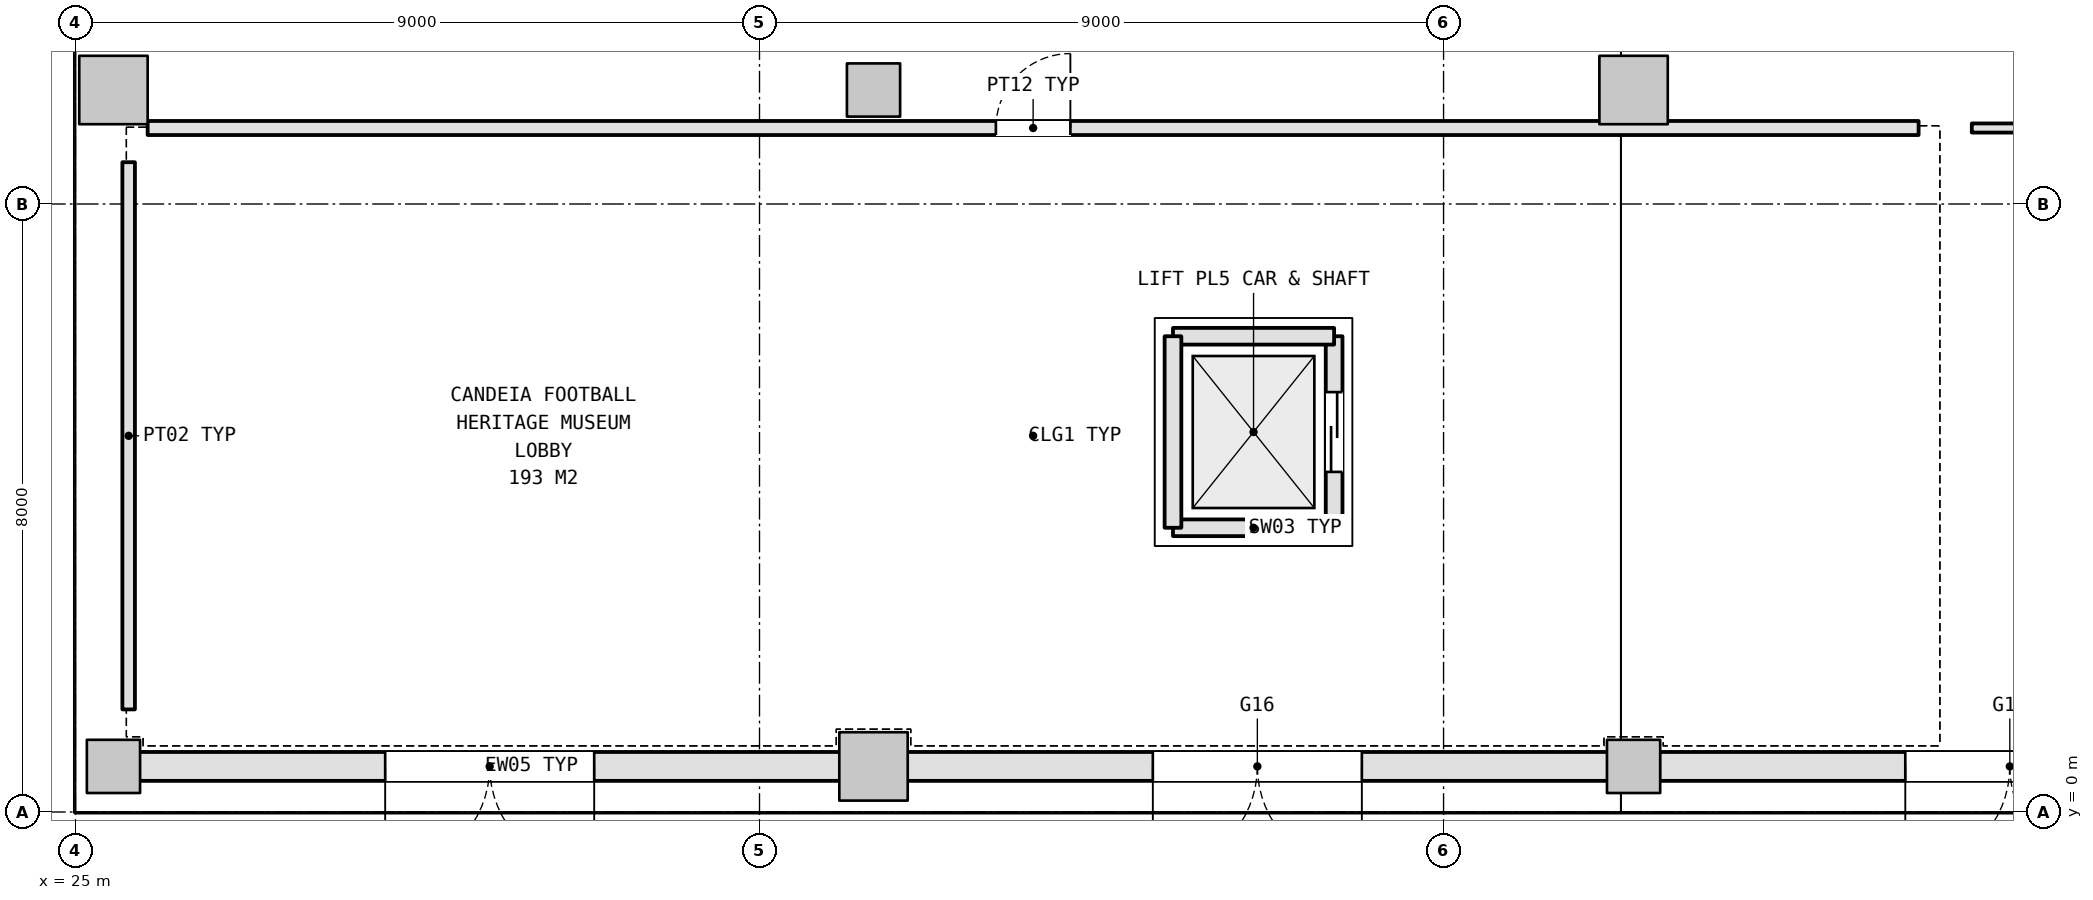
"""IFC4 building model, lengths in metres.
Left out: names, types, materials, properties, quantities, classifications, styles, units other than length and angle.
Written with IfcOpenShell. Run it as: python <this file> out.ifc"""

import sys

from ifc_helpers import new_model, si_unit, direction, frame, frame_2d, origin, origin_2d, place, context, subcontext, project, spatial, rectangle, extrude, element, fill, save


model = new_model("IFC4")
c1 = context("Model", 3, precision=1e-05, world=origin(), true_north=direction((0.0, 1.0)))
c2 = subcontext(c1, "Body", "Model", "MODEL_VIEW")
j1 = project(units=[si_unit("LENGTHUNIT", "METRE"), si_unit("PLANEANGLEUNIT", "RADIAN")], contexts=[c1])
p1 = place(None, origin())
s1 = spatial("IfcSite", under=j1, at=p1, CompositionType="ELEMENT")
p2 = place(p1, origin())
s2 = spatial("IfcBuilding", under=s1, at=p2, CompositionType="ELEMENT")
p3 = place(p2, origin())
s3 = spatial("IfcBuildingStorey", under=s2, at=p3, CompositionType="ELEMENT", Elevation=0.0)
p4 = place(p3, frame((25.5, 0.6, 0.0), z_axis=(0.0, 0.0, 1.0), x_axis=(1.0, 0.0, 0.0)))
e1 = element("IfcColumn", 1, at=p4, inside=s3, PredefinedType="COLUMN", context=c2, shape_type="SweptSolid", body=[
    extrude(rectangle(XDim=0.7, YDim=0.7, at=origin_2d()), origin(), (0.0, 0.0, 1.0), 5.4),
])
for number, where, z_axis, x_axis in (
    (2, (25.5, 9.5, 0.0), (0.0, 0.0, 1.0), (1.0, 0.0, 0.0)),
    (3, (35.5, 0.6, 0.0), (0.0, 0.0, 1.0), (1.0, 0.0, 0.0)),
):
    element("IfcColumn", number, at=place(p3, frame(where, z_axis=z_axis, x_axis=x_axis)), inside=s3, PredefinedType="COLUMN", context=c2, shape_type="SweptSolid", body=[
        extrude(rectangle(XDim=0.9, YDim=0.9, at=origin_2d()), origin(), (0.0, 0.0, 1.0), 5.4),
    ])
for number, where, z_axis, x_axis in (
    (4, (35.5, 9.5, 0.0), (0.0, 0.0, 1.0), (1.0, 0.0, 0.0)),
    (5, (45.5, 0.6, 0.0), (0.0, 0.0, 1.0), (1.0, 0.0, 0.0)),
):
    element("IfcColumn", number, at=place(p3, frame(where, z_axis=z_axis, x_axis=x_axis)), inside=s3, PredefinedType="COLUMN", context=c2, shape_type="SweptSolid", body=[
        extrude(rectangle(XDim=0.7, YDim=0.7, at=origin_2d()), origin(), (0.0, 0.0, 1.0), 5.4),
    ])
p5 = place(p3, frame((45.5, 9.5, 0.0), z_axis=(0.0, 0.0, 1.0), x_axis=(1.0, 0.0, 0.0)))
e6 = element("IfcColumn", 6, at=p5, inside=s3, PredefinedType="COLUMN", context=c2, shape_type="SweptSolid", body=[
    extrude(rectangle(XDim=0.9, YDim=0.9, at=origin_2d()), origin(), (0.0, 0.0, 1.0), 5.4),
])
p6 = place(p3, frame((25.838, 0.6, 0.0), z_axis=(0.0, 0.0, 1.0), x_axis=(1.0, 0.0, 0.0)))
e7 = element("IfcWall", 7, at=p6, inside=s3, PredefinedType="SOLIDWALL", context=c2, shape_type="SweptSolid", body=[
    extrude(rectangle(XDim=9.224, YDim=0.38, at=frame_2d((4.612, 0.0))), origin(), (0.0, 0.0, 1.0), 4.425),
])
p7 = place(p6, frame((3.237, 0.0, 0.0)))
e8 = element("IfcOpeningElement", 8, at=p7, cuts=e7, PredefinedType="OPENING", context=c2, shape_type="SweptSolid", body=[
    extrude(rectangle(XDim=2.75, YDim=2.4, at=frame_2d((1.375, 1.2))), frame((0.0, 0.2, 0.0), z_axis=(0.0, -1.0, 0.0), x_axis=(1.0, 0.0, 0.0)), (0.0, 0.0, 1.0), 0.4),
])
p8 = place(p3, frame((35.938, 0.6, 0.0), z_axis=(0.0, 0.0, 1.0), x_axis=(1.0, 0.0, 0.0)))
e9 = element("IfcWall", 9, at=p8, inside=s3, PredefinedType="SOLIDWALL", context=c2, shape_type="SweptSolid", body=[
    extrude(rectangle(XDim=9.224, YDim=0.38, at=frame_2d((4.612, 0.0))), origin(), (0.0, 0.0, 1.0), 4.425),
])
p9 = place(p8, frame((3.237, 0.0, 0.0)))
e10 = element("IfcOpeningElement", 10, at=p9, cuts=e9, PredefinedType="OPENING", context=c2, shape_type="SweptSolid", body=[
    extrude(rectangle(XDim=2.75, YDim=2.4, at=frame_2d((1.375, 1.2))), frame((0.0, 0.2, 0.0), z_axis=(0.0, -1.0, 0.0), x_axis=(1.0, 0.0, 0.0)), (0.0, 0.0, 1.0), 0.4),
])
p10 = place(p3, frame((45.838, 0.6, 0.0), z_axis=(0.0, 0.0, 1.0), x_axis=(1.0, 0.0, 0.0)))
e11 = element("IfcWall", 11, at=p10, inside=s3, PredefinedType="SOLIDWALL", context=c2, shape_type="SweptSolid", body=[
    extrude(rectangle(XDim=9.224, YDim=0.38, at=frame_2d((4.612, 0.0))), origin(), (0.0, 0.0, 1.0), 4.425),
])
p11 = place(p10, frame((3.237, 0.0, 0.0)))
e12 = element("IfcOpeningElement", 12, at=p11, cuts=e11, PredefinedType="OPENING", context=c2, shape_type="SweptSolid", body=[
    extrude(rectangle(XDim=2.75, YDim=2.4, at=frame_2d((1.375, 1.2))), frame((0.0, 0.2, 0.0), z_axis=(0.0, -1.0, 0.0), x_axis=(1.0, 0.0, 0.0)), (0.0, 0.0, 1.0), 0.4),
])
p12 = place(p3, frame((39.44, 3.74, -1.1), z_axis=(0.0, 0.0, 1.0), x_axis=(1.0, 0.0, 0.0)))
e13 = element("IfcWall", 13, at=p12, inside=s3, PredefinedType="SHEAR", context=c2, shape_type="SweptSolid", body=[
    extrude(rectangle(XDim=2.12, YDim=0.22, at=frame_2d((1.06, 0.0))), origin(), (0.0, 0.0, 1.0), 6.24),
])
p13 = place(p3, frame((41.56, 3.74, -1.1), z_axis=(0.0, 0.0, 1.0), x_axis=(0.0, 1.0, 0.0)))
e14 = element("IfcWall", 14, at=p13, inside=s3, PredefinedType="SHEAR", context=c2, shape_type="SweptSolid", body=[
    extrude(rectangle(XDim=2.52, YDim=0.22, at=frame_2d((1.26, 0.0))), origin(), (0.0, 0.0, 1.0), 6.24),
])
p14 = place(p13, frame((0.735, 0.0, 1.1)))
e15 = element("IfcOpeningElement", 15, at=p14, cuts=e14, PredefinedType="OPENING", context=c2, shape_type="SweptSolid", body=[
    extrude(rectangle(XDim=1.05, YDim=2.15, at=frame_2d((0.525, 1.075))), frame((0.0, 0.12, 0.0), z_axis=(0.0, -1.0, 0.0), x_axis=(1.0, 0.0, 0.0)), (0.0, 0.0, 1.0), 0.24),
])
p15 = place(p3, frame((41.56, 6.26, -1.1), z_axis=(0.0, 0.0, 1.0), x_axis=(-1.0, 0.0, 0.0)))
e16 = element("IfcWall", 16, at=p15, inside=s3, PredefinedType="SHEAR", context=c2, shape_type="SweptSolid", body=[
    extrude(rectangle(XDim=2.12, YDim=0.22, at=frame_2d((1.06, 0.0))), origin(), (0.0, 0.0, 1.0), 6.24),
])
p16 = place(p3, frame((39.44, 6.26, -1.1), z_axis=(0.0, 0.0, 1.0), x_axis=(0.0, -1.0, 0.0)))
e17 = element("IfcWall", 17, at=p16, inside=s3, PredefinedType="SHEAR", context=c2, shape_type="SweptSolid", body=[
    extrude(rectangle(XDim=2.52, YDim=0.22, at=frame_2d((1.26, 0.0))), origin(), (0.0, 0.0, 1.0), 6.24),
])
p17 = place(p3, frame((25.95, 9.0, 0.0), z_axis=(0.0, 0.0, 1.0), x_axis=(1.0, 0.0, 0.0)))
e18 = element("IfcWall", 18, at=p17, inside=s3, PredefinedType="PARTITIONING", context=c2, shape_type="SweptSolid", body=[
    extrude(rectangle(XDim=23.3, YDim=0.185, at=frame_2d((11.65, 0.0))), origin(), (0.0, 0.0, 1.0), 4.425),
])
p18 = place(p17, frame((11.16, 0.0, 0.0)))
e19 = element("IfcOpeningElement", 19, at=p18, cuts=e18, PredefinedType="OPENING", context=c2, shape_type="SweptSolid", body=[
    extrude(rectangle(XDim=0.98, YDim=2.15, at=frame_2d((0.49, 1.075))), frame((0.0, 0.103, 0.0), z_axis=(0.0, -1.0, 0.0), x_axis=(1.0, 0.0, 0.0)), (0.0, 0.0, 1.0), 0.205),
])
p19 = place(p3, frame((25.7, 1.35, 0.0), z_axis=(0.0, 0.0, 1.0), x_axis=(0.0, 1.0, 0.0)))
e20 = element("IfcWall", 20, at=p19, inside=s3, PredefinedType="PARTITIONING", context=c2, shape_type="SweptSolid", body=[
    extrude(rectangle(XDim=7.2, YDim=0.165, at=frame_2d((3.6, 0.0))), origin(), (0.0, 0.0, 1.0), 4.475),
])
p20 = place(p3, frame((49.95, 9.0, 0.0), z_axis=(0.0, 0.0, 1.0), x_axis=(1.0, 0.0, 0.0)))
e21 = element("IfcWall", 21, at=p20, inside=s3, PredefinedType="PARTITIONING", context=c2, shape_type="SweptSolid", body=[
    extrude(rectangle(XDim=16.96, YDim=0.12, at=frame_2d((8.48, 0.0))), origin(), (0.0, 0.0, 1.0), 4.425),
])
p21 = place(p20, frame((7.92, 0.0, 0.0)))
e22 = element("IfcOpeningElement", 22, at=p21, cuts=e21, PredefinedType="OPENING", context=c2, shape_type="SweptSolid", body=[
    extrude(rectangle(XDim=1.12, YDim=2.2, at=frame_2d((0.56, 1.1))), frame((0.0, 0.07, 0.0), z_axis=(0.0, -1.0, 0.0), x_axis=(1.0, 0.0, 0.0)), (0.0, 0.0, 1.0), 0.14),
])
p22 = place(p7, frame((2.75, 0.0, 0.0), z_axis=(0.0, 0.0, 1.0), x_axis=(-1.0, 0.0, 0.0)))
e23 = element("IfcDoor", 23, at=p22, inside=s3, OperationType="DOUBLE_DOOR_SINGLE_SWING", PredefinedType="DOOR", context=c2, shape_type="SweptSolid", body=[
    extrude(rectangle(XDim=2.75, YDim=2.4, at=frame_2d((1.375, 1.2))), frame((0.0, 0.025, 0.0), z_axis=(0.0, -1.0, 0.0), x_axis=(1.0, 0.0, 0.0)), (0.0, 0.0, 1.0), 0.05),
])
fill(e8, e23)
p23 = place(p9, frame((2.75, 0.0, 0.0), z_axis=(0.0, 0.0, 1.0), x_axis=(-1.0, 0.0, 0.0)))
e24 = element("IfcDoor", 24, at=p23, inside=s3, OperationType="DOUBLE_DOOR_SINGLE_SWING", PredefinedType="DOOR", context=c2, shape_type="SweptSolid", body=[
    extrude(rectangle(XDim=2.75, YDim=2.4, at=frame_2d((1.375, 1.2))), frame((0.0, 0.025, 0.0), z_axis=(0.0, -1.0, 0.0), x_axis=(1.0, 0.0, 0.0)), (0.0, 0.0, 1.0), 0.05),
])
fill(e10, e24)
p24 = place(p11, frame((2.75, 0.0, 0.0), z_axis=(0.0, 0.0, 1.0), x_axis=(-1.0, 0.0, 0.0)))
e25 = element("IfcDoor", 25, at=p24, inside=s3, OperationType="DOUBLE_DOOR_SINGLE_SWING", PredefinedType="DOOR", context=c2, shape_type="SweptSolid", body=[
    extrude(rectangle(XDim=2.75, YDim=2.4, at=frame_2d((1.375, 1.2))), frame((0.0, 0.025, 0.0), z_axis=(0.0, -1.0, 0.0), x_axis=(1.0, 0.0, 0.0)), (0.0, 0.0, 1.0), 0.05),
])
fill(e12, e25)
p25 = place(p14, origin())
e26 = element("IfcDoor", 26, at=p25, inside=s3, OperationType="DOUBLE_DOOR_SLIDING", PredefinedType="DOOR", context=c2, shape_type="SweptSolid", body=[
    extrude(rectangle(XDim=1.05, YDim=2.15, at=frame_2d((0.525, 1.075))), frame((0.0, 0.025, 0.0), z_axis=(0.0, -1.0, 0.0), x_axis=(1.0, 0.0, 0.0)), (0.0, 0.0, 1.0), 0.05),
])
fill(e15, e26)
p26 = place(p18, origin())
e27 = element("IfcDoor", 27, at=p26, inside=s3, OperationType="SINGLE_SWING_RIGHT", PredefinedType="DOOR", context=c2, shape_type="SweptSolid", body=[
    extrude(rectangle(XDim=0.98, YDim=2.15, at=frame_2d((0.49, 1.075))), frame((0.0, 0.025, 0.0), z_axis=(0.0, -1.0, 0.0), x_axis=(1.0, 0.0, 0.0)), (0.0, 0.0, 1.0), 0.05),
])
fill(e19, e27)
save(model, sys.argv[1])
